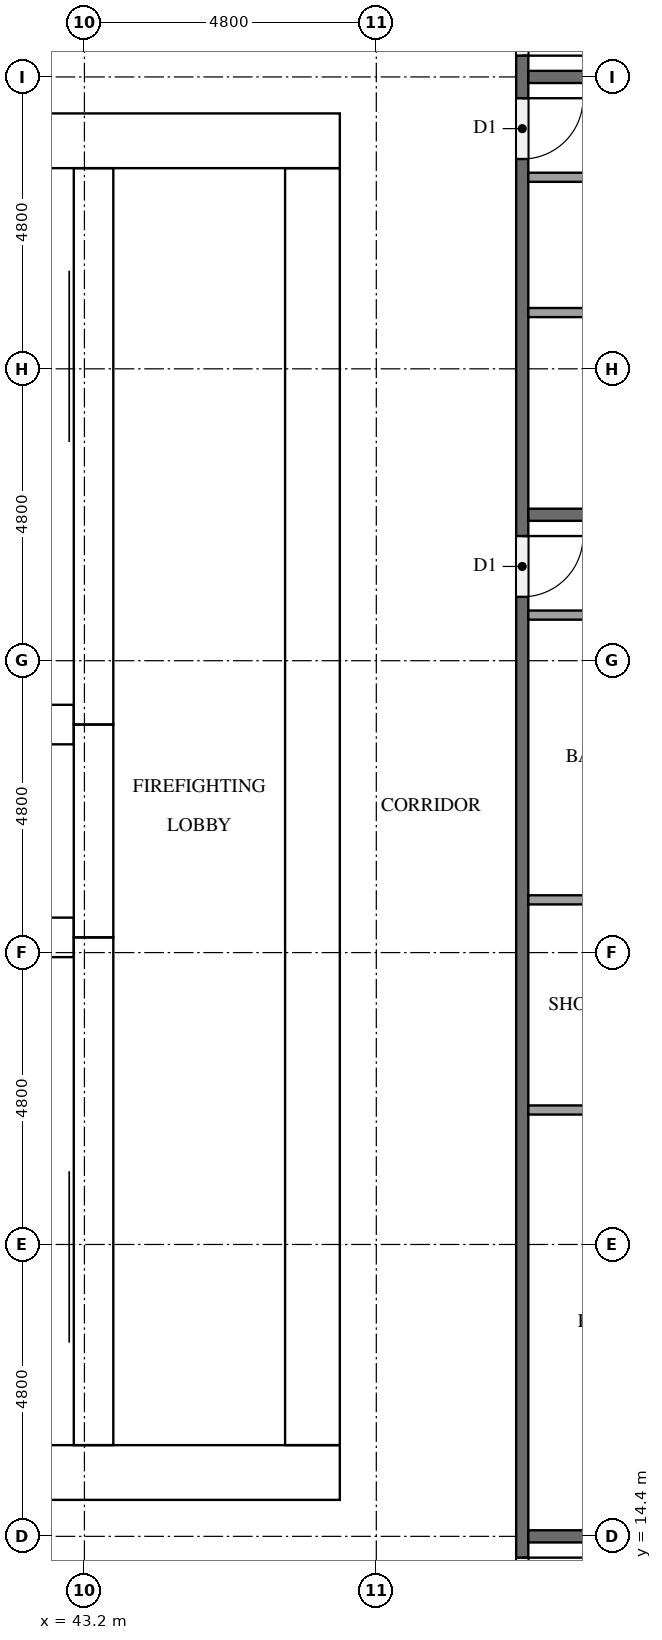
"""IFC4 building model, lengths in metres.
Left out: names, types, materials, properties, quantities, classifications, styles, units other than length and angle.
Written with IfcOpenShell. Run it as: python <this file> out.ifc"""

import sys

from ifc_helpers import new_model, si_unit, direction, frame, frame_2d, origin, place, context, subcontext, project, spatial, rectangle, extrude, element, fill, save


model = new_model("IFC4")
c1 = context("Model", 3, precision=1e-05, world=origin(), true_north=direction((0.0, 1.0)))
c2 = subcontext(c1, "Body", "Model", "MODEL_VIEW")
j1 = project(units=[si_unit("LENGTHUNIT", "METRE"), si_unit("PLANEANGLEUNIT", "RADIAN")], contexts=[c1])
p1 = place(None, origin())
s1 = spatial("IfcSite", under=j1, at=p1, CompositionType="ELEMENT")
p2 = place(p1, origin())
s2 = spatial("IfcBuilding", under=s1, at=p2, CompositionType="ELEMENT")
p3 = place(p2, frame((0.0, 0.0, 80.3)))
s3 = spatial("IfcBuildingStorey", under=s2, at=p3, CompositionType="ELEMENT", Elevation=80.3)
p4 = place(p3, frame((15.0, 15.45, 0.0), z_axis=(0.0, 0.0, 1.0), x_axis=(1.0, 0.0, 0.0)))
e1 = element("IfcWall", 1, at=p4, inside=s3, PredefinedType="SHEAR", context=c2, shape_type="SweptSolid", body=[
    extrude(rectangle(XDim=32.4, YDim=0.9, at=frame_2d((16.2, 0.0))), origin(), (0.0, 0.0, 1.0), 3.1),
])
p5 = place(p4, frame((15.3, 0.0, 0.0)))
e2 = element("IfcOpeningElement", 2, at=p5, cuts=e1, PredefinedType="OPENING", context=c2, shape_type="SweptSolid", body=[
    extrude(rectangle(XDim=1.8, YDim=2.1, at=frame_2d((0.9, 1.05))), frame((0.0, 0.46, 0.0), z_axis=(0.0, -1.0, 0.0), x_axis=(1.0, 0.0, 0.0)), (0.0, 0.0, 1.0), 0.92),
])
p6 = place(p3, frame((15.0, 37.35, 0.0), z_axis=(0.0, 0.0, 1.0), x_axis=(1.0, 0.0, 0.0)))
e3 = element("IfcWall", 3, at=p6, inside=s3, PredefinedType="SHEAR", context=c2, shape_type="SweptSolid", body=[
    extrude(rectangle(XDim=32.4, YDim=0.9, at=frame_2d((16.2, 0.0))), origin(), (0.0, 0.0, 1.0), 3.1),
])
p7 = place(p6, frame((15.3, 0.0, 0.0)))
e4 = element("IfcOpeningElement", 4, at=p7, cuts=e3, PredefinedType="OPENING", context=c2, shape_type="SweptSolid", body=[
    extrude(rectangle(XDim=1.8, YDim=2.1, at=frame_2d((0.9, 1.05))), frame((0.0, 0.46, 0.0), z_axis=(0.0, -1.0, 0.0), x_axis=(1.0, 0.0, 0.0)), (0.0, 0.0, 1.0), 0.92),
])
p8 = place(p6, frame((1.794, 0.0, 0.0)))
e5 = element("IfcOpeningElement", 5, at=p8, cuts=e3, PredefinedType="OPENING", context=c2, shape_type="SweptSolid", body=[
    extrude(rectangle(XDim=1.0, YDim=2.1, at=frame_2d((0.5, 1.05))), frame((0.0, 0.46, 0.0), z_axis=(0.0, -1.0, 0.0), x_axis=(1.0, 0.0, 0.0)), (0.0, 0.0, 1.0), 0.92),
])
p9 = place(p6, frame((5.331, 0.0, 0.0)))
e6 = element("IfcOpeningElement", 6, at=p9, cuts=e3, PredefinedType="OPENING", context=c2, shape_type="SweptSolid", body=[
    extrude(rectangle(XDim=1.0, YDim=2.1, at=frame_2d((0.5, 1.05))), frame((0.0, 0.46, 0.0), z_axis=(0.0, -1.0, 0.0), x_axis=(1.0, 0.0, 0.0)), (0.0, 0.0, 1.0), 0.92),
])
p10 = place(p3, frame((46.95, 15.9, 0.0), z_axis=(0.0, 0.0, 1.0), x_axis=(0.0, 1.0, 0.0)))
e7 = element("IfcWall", 7, at=p10, inside=s3, PredefinedType="SHEAR", context=c2, shape_type="SweptSolid", body=[
    extrude(rectangle(XDim=21.0, YDim=0.9, at=frame_2d((10.5, 0.0))), origin(), (0.0, 0.0, 1.0), 3.1),
])
p11 = place(p10, frame((10.2, 0.0, 0.0)))
e8 = element("IfcOpeningElement", 8, at=p11, cuts=e7, PredefinedType="OPENING", context=c2, shape_type="SweptSolid", body=[
    extrude(rectangle(XDim=1.2, YDim=2.1, at=frame_2d((0.6, 1.05))), frame((0.0, 0.46, 0.0), z_axis=(0.0, -1.0, 0.0), x_axis=(1.0, 0.0, 0.0)), (0.0, 0.0, 1.0), 0.92),
])
p12 = place(p3, frame((43.35, 15.9, 0.0), z_axis=(0.0, 0.0, 1.0), x_axis=(0.0, 1.0, 0.0)))
e9 = element("IfcWall", 9, at=p12, inside=s3, PredefinedType="SHEAR", context=c2, shape_type="SweptSolid", body=[
    extrude(rectangle(XDim=8.35, YDim=0.65, at=frame_2d((4.175, 0.0))), origin(), (0.0, 0.0, 1.0), 3.1),
])
p13 = place(p12, frame((0.3, 0.0, 0.0)))
e10 = element("IfcOpeningElement", 10, at=p13, cuts=e9, PredefinedType="OPENING", context=c2, shape_type="SweptSolid", body=[
    extrude(rectangle(XDim=1.2, YDim=2.1, at=frame_2d((0.6, 1.05))), frame((0.0, 0.335, 0.0), z_axis=(0.0, -1.0, 0.0), x_axis=(1.0, 0.0, 0.0)), (0.0, 0.0, 1.0), 0.67),
])
p14 = place(p3, frame((43.35, 24.25, 0.0), z_axis=(0.0, 0.0, 1.0), x_axis=(0.0, 1.0, 0.0)))
e11 = element("IfcWall", 11, at=p14, inside=s3, PredefinedType="SHEAR", context=c2, shape_type="SweptSolid", body=[
    extrude(rectangle(XDim=3.5, YDim=0.65, at=frame_2d((1.75, 0.0))), origin(), (0.0, 0.0, 1.0), 3.1),
])
p15 = place(p14, frame((1.2, 0.0, 0.0)))
e12 = element("IfcOpeningElement", 12, at=p15, cuts=e11, PredefinedType="OPENING", context=c2, shape_type="SweptSolid", body=[
    extrude(rectangle(XDim=1.1, YDim=2.1, at=frame_2d((0.55, 1.05))), frame((0.0, 0.335, 0.0), z_axis=(0.0, -1.0, 0.0), x_axis=(1.0, 0.0, 0.0)), (0.0, 0.0, 1.0), 0.67),
])
p16 = place(p3, frame((43.35, 27.75, 0.0), z_axis=(0.0, 0.0, 1.0), x_axis=(0.0, 1.0, 0.0)))
e13 = element("IfcWall", 13, at=p16, inside=s3, PredefinedType="SHEAR", context=c2, shape_type="SweptSolid", body=[
    extrude(rectangle(XDim=9.15, YDim=0.65, at=frame_2d((4.575, 0.0))), origin(), (0.0, 0.0, 1.0), 3.1),
])
p17 = place(p16, frame((7.65, 0.0, 0.0)))
e14 = element("IfcOpeningElement", 14, at=p17, cuts=e13, PredefinedType="OPENING", context=c2, shape_type="SweptSolid", body=[
    extrude(rectangle(XDim=1.2, YDim=2.1, at=frame_2d((0.6, 1.05))), frame((0.0, 0.335, 0.0), z_axis=(0.0, -1.0, 0.0), x_axis=(1.0, 0.0, 0.0)), (0.0, 0.0, 1.0), 0.67),
])
for number, where, z_axis, x_axis in (
    (15, (39.625, 24.25, 0.0), (0.0, 0.0, 1.0), (1.0, 0.0, 0.0)),
    (16, (39.625, 27.75, 0.0), (0.0, 0.0, 1.0), (1.0, 0.0, 0.0)),
):
    element("IfcWall", number, at=place(p3, frame(where, z_axis=z_axis, x_axis=x_axis)), inside=s3, PredefinedType="SHEAR", context=c2, shape_type="SweptSolid", body=[
        extrude(rectangle(XDim=3.4, YDim=0.65, at=frame_2d((1.7, 0.0))), origin(), (0.0, 0.0, 1.0), 3.1),
    ])
p18 = place(p3, frame((50.4, 40.7, 0.0), z_axis=(0.0, 0.0, 1.0), x_axis=(0.0, -1.0, 0.0)))
e17 = element("IfcWall", 17, at=p18, inside=s3, PredefinedType="PARTITIONING", context=c2, shape_type="SweptSolid", body=[
    extrude(rectangle(XDim=28.6, YDim=0.2, at=frame_2d((14.3, 0.0))), origin(), (0.0, 0.0, 1.0), 3.1),
])
p19 = place(p18, frame((26.65, 0.0, 0.0)))
e18 = element("IfcOpeningElement", 18, at=p19, cuts=e17, PredefinedType="OPENING", context=c2, shape_type="SweptSolid", body=[
    extrude(rectangle(XDim=1.0, YDim=2.1, at=frame_2d((0.5, 1.05))), frame((0.0, 0.11, 0.0), z_axis=(0.0, -1.0, 0.0), x_axis=(1.0, 0.0, 0.0)), (0.0, 0.0, 1.0), 0.22),
])
p20 = place(p18, frame((9.85, 0.0, 0.0)))
e19 = element("IfcOpeningElement", 19, at=p20, cuts=e17, PredefinedType="OPENING", context=c2, shape_type="SweptSolid", body=[
    extrude(rectangle(XDim=1.0, YDim=2.1, at=frame_2d((0.5, 1.05))), frame((0.0, 0.11, 0.0), z_axis=(0.0, -1.0, 0.0), x_axis=(1.0, 0.0, 0.0)), (0.0, 0.0, 1.0), 0.22),
])
p21 = place(p18, frame((2.65, 0.0, 0.0)))
e20 = element("IfcOpeningElement", 20, at=p21, cuts=e17, PredefinedType="OPENING", context=c2, shape_type="SweptSolid", body=[
    extrude(rectangle(XDim=1.0, YDim=2.1, at=frame_2d((0.5, 1.05))), frame((0.0, 0.11, 0.0), z_axis=(0.0, -1.0, 0.0), x_axis=(1.0, 0.0, 0.0)), (0.0, 0.0, 1.0), 0.22),
])
p22 = place(p18, frame((0.95, 0.0, 0.0)))
e21 = element("IfcOpeningElement", 21, at=p22, cuts=e17, PredefinedType="OPENING", context=c2, shape_type="SweptSolid", body=[
    extrude(rectangle(XDim=1.0, YDim=2.1, at=frame_2d((0.5, 1.05))), frame((0.0, 0.11, 0.0), z_axis=(0.0, -1.0, 0.0), x_axis=(1.0, 0.0, 0.0)), (0.0, 0.0, 1.0), 0.22),
])
p23 = place(p3, frame((50.5, 14.4, 0.0), z_axis=(0.0, 0.0, 1.0), x_axis=(1.0, 0.0, 0.0)))
e22 = element("IfcWall", 22, at=p23, inside=s3, PredefinedType="PARTITIONING", context=c2, shape_type="SweptSolid", body=[
    extrude(rectangle(XDim=11.475, YDim=0.2, at=frame_2d((5.738, 0.0))), origin(), (0.0, 0.0, 1.0), 3.1),
])
for number, where, z_axis, x_axis in (
    (23, (50.5, 31.2, 0.0), (0.0, 0.0, 1.0), (1.0, 0.0, 0.0)),
    (24, (50.5, 38.4, 0.0), (0.0, 0.0, 1.0), (1.0, 0.0, 0.0)),
):
    element("IfcWall", number, at=place(p3, frame(where, z_axis=z_axis, x_axis=x_axis)), inside=s3, PredefinedType="PARTITIONING", context=c2, shape_type="SweptSolid", body=[
        extrude(rectangle(XDim=11.8, YDim=0.2, at=frame_2d((5.9, 0.0))), origin(), (0.0, 0.0, 1.0), 3.1),
    ])
for number, where, z_axis, x_axis in (
    (25, (50.5, 24.867, 0.0), (0.0, 0.0, 1.0), (1.0, 0.0, 0.0)),
    (26, (50.5, 21.412, 0.0), (0.0, 0.0, 1.0), (1.0, 0.0, 0.0)),
):
    element("IfcWall", number, at=place(p3, frame(where, z_axis=z_axis, x_axis=x_axis)), inside=s3, PredefinedType="PARTITIONING", context=c2, shape_type="SweptSolid", body=[
        extrude(rectangle(XDim=3.725, YDim=0.15, at=frame_2d((1.863, 0.0))), origin(), (0.0, 0.0, 1.0), 3.1),
    ])
p24 = place(p3, frame((50.5, 29.55, 0.0), z_axis=(0.0, 0.0, 1.0), x_axis=(1.0, 0.0, 0.0)))
e27 = element("IfcWall", 27, at=p24, inside=s3, PredefinedType="PARTITIONING", context=c2, shape_type="SweptSolid", body=[
    extrude(rectangle(XDim=3.875, YDim=0.15, at=frame_2d((1.938, 0.0))), origin(), (0.0, 0.0, 1.0), 3.1),
])
p25 = place(p3, frame((50.5, 34.525, 0.0), z_axis=(0.0, 0.0, 1.0), x_axis=(1.0, 0.0, 0.0)))
e28 = element("IfcWall", 28, at=p25, inside=s3, PredefinedType="PARTITIONING", context=c2, shape_type="SweptSolid", body=[
    extrude(rectangle(XDim=4.475, YDim=0.15, at=frame_2d((2.238, 0.0))), origin(), (0.0, 0.0, 1.0), 3.1),
])
p26 = place(p3, frame((50.5, 36.75, 0.0), z_axis=(0.0, 0.0, 1.0), x_axis=(1.0, 0.0, 0.0)))
e29 = element("IfcWall", 29, at=p26, inside=s3, PredefinedType="PARTITIONING", context=c2, shape_type="SweptSolid", body=[
    extrude(rectangle(XDim=4.625, YDim=0.15, at=frame_2d((2.312, 0.0))), origin(), (0.0, 0.0, 1.0), 3.1),
])
p27 = place(p15, origin())
e30 = element("IfcDoor", 30, at=p27, inside=s3, OperationType="DOUBLE_DOOR_SLIDING", PredefinedType="DOOR", context=c2, shape_type="SweptSolid", body=[
    extrude(rectangle(XDim=1.1, YDim=2.1, at=frame_2d((0.55, 1.05))), frame((0.0, 0.025, 0.0), z_axis=(0.0, -1.0, 0.0), x_axis=(1.0, 0.0, 0.0)), (0.0, 0.0, 1.0), 0.05),
])
fill(e12, e30)
p28 = place(p13, origin())
e31 = element("IfcDoor", 31, at=p28, inside=s3, OperationType="SINGLE_SWING_LEFT", PredefinedType="DOOR", context=c2, shape_type="SweptSolid", body=[
    extrude(rectangle(XDim=1.2, YDim=2.1, at=frame_2d((0.6, 1.05))), frame((0.0, 0.025, 0.0), z_axis=(0.0, -1.0, 0.0), x_axis=(1.0, 0.0, 0.0)), (0.0, 0.0, 1.0), 0.05),
])
fill(e10, e31)
p29 = place(p17, origin())
e32 = element("IfcDoor", 32, at=p29, inside=s3, OperationType="SINGLE_SWING_RIGHT", PredefinedType="DOOR", context=c2, shape_type="SweptSolid", body=[
    extrude(rectangle(XDim=1.2, YDim=2.1, at=frame_2d((0.6, 1.05))), frame((0.0, 0.025, 0.0), z_axis=(0.0, -1.0, 0.0), x_axis=(1.0, 0.0, 0.0)), (0.0, 0.0, 1.0), 0.05),
])
fill(e14, e32)
p30 = place(p11, origin())
e33 = element("IfcDoor", 33, at=p30, inside=s3, OperationType="SINGLE_SWING_RIGHT", PredefinedType="DOOR", context=c2, shape_type="SweptSolid", body=[
    extrude(rectangle(XDim=1.2, YDim=2.1, at=frame_2d((0.6, 1.05))), frame((0.0, 0.025, 0.0), z_axis=(0.0, -1.0, 0.0), x_axis=(1.0, 0.0, 0.0)), (0.0, 0.0, 1.0), 0.05),
])
fill(e8, e33)
p31 = place(p19, origin())
e34 = element("IfcDoor", 34, at=p31, inside=s3, OperationType="SINGLE_SWING_LEFT", PredefinedType="DOOR", context=c2, shape_type="SweptSolid", body=[
    extrude(rectangle(XDim=1.0, YDim=2.1, at=frame_2d((0.5, 1.05))), frame((0.0, 0.025, 0.0), z_axis=(0.0, -1.0, 0.0), x_axis=(1.0, 0.0, 0.0)), (0.0, 0.0, 1.0), 0.05),
])
fill(e18, e34)
p32 = place(p20, origin())
e35 = element("IfcDoor", 35, at=p32, inside=s3, OperationType="SINGLE_SWING_LEFT", PredefinedType="DOOR", context=c2, shape_type="SweptSolid", body=[
    extrude(rectangle(XDim=1.0, YDim=2.1, at=frame_2d((0.5, 1.05))), frame((0.0, 0.025, 0.0), z_axis=(0.0, -1.0, 0.0), x_axis=(1.0, 0.0, 0.0)), (0.0, 0.0, 1.0), 0.05),
])
fill(e19, e35)
p33 = place(p21, origin())
e36 = element("IfcDoor", 36, at=p33, inside=s3, OperationType="SINGLE_SWING_LEFT", PredefinedType="DOOR", context=c2, shape_type="SweptSolid", body=[
    extrude(rectangle(XDim=1.0, YDim=2.1, at=frame_2d((0.5, 1.05))), frame((0.0, 0.025, 0.0), z_axis=(0.0, -1.0, 0.0), x_axis=(1.0, 0.0, 0.0)), (0.0, 0.0, 1.0), 0.05),
])
fill(e20, e36)
p34 = place(p22, origin())
e37 = element("IfcDoor", 37, at=p34, inside=s3, OperationType="SINGLE_SWING_RIGHT", PredefinedType="DOOR", context=c2, shape_type="SweptSolid", body=[
    extrude(rectangle(XDim=1.0, YDim=2.1, at=frame_2d((0.5, 1.05))), frame((0.0, 0.025, 0.0), z_axis=(0.0, -1.0, 0.0), x_axis=(1.0, 0.0, 0.0)), (0.0, 0.0, 1.0), 0.05),
])
fill(e21, e37)
save(model, sys.argv[1])
